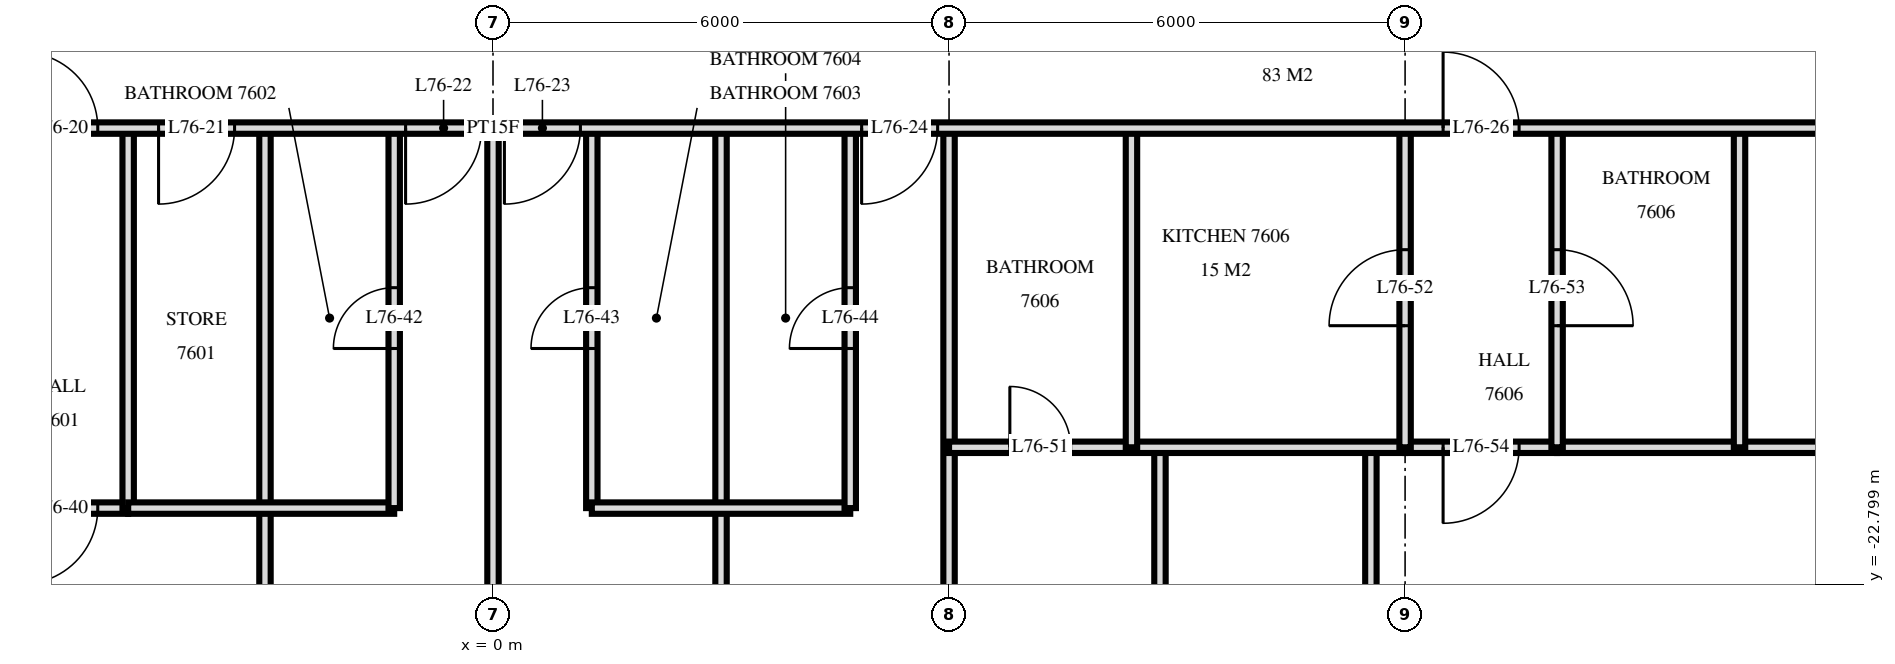
"""IFC4 building model, lengths in metres.
Left out: names, types, materials, properties, quantities, classifications, styles, units other than length and angle.
Written with IfcOpenShell. Run it as: python <this file> out.ifc"""

import sys

from ifc_helpers import new_model, si_unit, direction, frame, frame_2d, origin, place, context, subcontext, project, spatial, rectangle, extrude, element, fill, save


model = new_model("IFC4")
c1 = context("Model", 3, precision=1e-05, world=origin(), true_north=direction((0.0, 1.0)))
c2 = subcontext(c1, "Body", "Model", "MODEL_VIEW")
j1 = project(units=[si_unit("LENGTHUNIT", "METRE"), si_unit("PLANEANGLEUNIT", "RADIAN")], contexts=[c1])
p1 = place(None, origin())
s1 = spatial("IfcSite", under=j1, at=p1, CompositionType="ELEMENT")
p2 = place(p1, origin())
s2 = spatial("IfcBuilding", under=s1, at=p2, CompositionType="ELEMENT")
p3 = place(p2, frame((0.0, 0.0, 287.6)))
s3 = spatial("IfcBuildingStorey", under=s2, at=p3, CompositionType="ELEMENT", Elevation=287.6)
p4 = place(p3, frame((16.4, -21.0, 0.0), z_axis=(0.0, 0.0, 1.0), x_axis=(0.0, 1.0, 0.0)))
e1 = element("IfcWall", 1, at=p4, inside=s3, PredefinedType="PARTITIONING", context=c2, shape_type="SweptSolid", body=[
    extrude(rectangle(XDim=4.2, YDim=0.15, at=frame_2d((2.1, 0.0))), origin(), (0.0, 0.0, 1.0), 3.22),
])
p5 = place(p3, frame((14.0, -21.0, 0.0), z_axis=(0.0, 0.0, 1.0), x_axis=(0.0, 1.0, 0.0)))
e2 = element("IfcWall", 2, at=p5, inside=s3, PredefinedType="PARTITIONING", context=c2, shape_type="SweptSolid", body=[
    extrude(rectangle(XDim=4.2, YDim=0.15, at=frame_2d((2.1, 0.0))), origin(), (0.0, 0.0, 1.0), 3.22),
])
p6 = place(p5, frame((1.6, 0.0, 0.0)))
e3 = element("IfcOpeningElement", 3, at=p6, cuts=e2, PredefinedType="OPENING", context=c2, shape_type="SweptSolid", body=[
    extrude(rectangle(XDim=1.0, YDim=2.1, at=frame_2d((0.5, 1.05))), frame((0.0, 0.085, 0.0), z_axis=(0.0, -1.0, 0.0), x_axis=(1.0, 0.0, 0.0)), (0.0, 0.0, 1.0), 0.17),
])
p7 = place(p3, frame((12.0, -21.0, 0.0), z_axis=(0.0, 0.0, 1.0), x_axis=(0.0, 1.0, 0.0)))
e4 = element("IfcWall", 4, at=p7, inside=s3, PredefinedType="PARTITIONING", context=c2, shape_type="SweptSolid", body=[
    extrude(rectangle(XDim=4.2, YDim=0.15, at=frame_2d((2.1, 0.0))), origin(), (0.0, 0.0, 1.0), 3.22),
])
p8 = place(p7, frame((1.6, 0.0, 0.0)))
e5 = element("IfcOpeningElement", 5, at=p8, cuts=e4, PredefinedType="OPENING", context=c2, shape_type="SweptSolid", body=[
    extrude(rectangle(XDim=1.0, YDim=2.1, at=frame_2d((0.5, 1.05))), frame((0.0, 0.085, 0.0), z_axis=(0.0, -1.0, 0.0), x_axis=(1.0, 0.0, 0.0)), (0.0, 0.0, 1.0), 0.17),
])
p9 = place(p3, frame((11.55, -33.62, 0.0), z_axis=(0.0, 0.0, 1.0), x_axis=(0.0, 1.0, 0.0)))
e6 = element("IfcWall", 6, at=p9, inside=s3, PredefinedType="PARTITIONING", context=c2, shape_type="SweptSolid", body=[
    extrude(rectangle(XDim=12.62, YDim=0.15, at=frame_2d((6.31, 0.0))), origin(), (0.0, 0.0, 1.0), 3.22),
])
p10 = place(p9, frame((5.79, 0.0, 0.0)))
e7 = element("IfcOpeningElement", 7, at=p10, cuts=e6, PredefinedType="OPENING", context=c2, shape_type="SweptSolid", body=[
    extrude(rectangle(XDim=0.9, YDim=2.1, at=frame_2d((0.45, 1.05))), frame((0.0, 0.085, 0.0), z_axis=(0.0, -1.0, 0.0), x_axis=(1.0, 0.0, 0.0)), (0.0, 0.0, 1.0), 0.17),
])
p11 = place(p3, frame((8.775, -33.62, 0.0), z_axis=(0.0, 0.0, 1.0), x_axis=(0.0, 1.0, 0.0)))
e8 = element("IfcWall", 8, at=p11, inside=s3, PredefinedType="PARTITIONING", context=c2, shape_type="SweptSolid", body=[
    extrude(rectangle(XDim=12.62, YDim=0.15, at=frame_2d((6.31, 0.0))), origin(), (0.0, 0.0, 1.0), 3.22),
])
p12 = place(p11, frame((5.77, 0.0, 0.0)))
e9 = element("IfcOpeningElement", 9, at=p12, cuts=e8, PredefinedType="OPENING", context=c2, shape_type="SweptSolid", body=[
    extrude(rectangle(XDim=0.9, YDim=2.1, at=frame_2d((0.45, 1.05))), frame((0.0, 0.085, 0.0), z_axis=(0.0, -1.0, 0.0), x_axis=(1.0, 0.0, 0.0)), (0.0, 0.0, 1.0), 0.17),
])
p13 = place(p3, frame((8.4, -21.0, 0.0), z_axis=(0.0, 0.0, 1.0), x_axis=(0.0, 1.0, 0.0)))
e10 = element("IfcWall", 10, at=p13, inside=s3, PredefinedType="PARTITIONING", context=c2, shape_type="SweptSolid", body=[
    extrude(rectangle(XDim=4.2, YDim=0.15, at=frame_2d((2.1, 0.0))), origin(), (0.0, 0.0, 1.0), 3.22),
])
p14 = place(p3, frame((6.0, -33.62, 0.0), z_axis=(0.0, 0.0, 1.0), x_axis=(0.0, 1.0, 0.0)))
e11 = element("IfcWall", 11, at=p14, inside=s3, PredefinedType="PARTITIONING", context=c2, shape_type="SweptSolid", body=[
    extrude(rectangle(XDim=16.82, YDim=0.15, at=frame_2d((8.41, 0.0))), origin(), (0.0, 0.0, 1.0), 3.22),
])
p15 = place(p3, frame((4.7, -21.8, 0.0), z_axis=(0.0, 0.0, 1.0), x_axis=(0.0, 1.0, 0.0)))
e12 = element("IfcWall", 12, at=p15, inside=s3, PredefinedType="PARTITIONING", context=c2, shape_type="SweptSolid", body=[
    extrude(rectangle(XDim=5.0, YDim=0.15, at=frame_2d((2.5, 0.0))), origin(), (0.0, 0.0, 1.0), 3.22),
])
p16 = place(p15, frame((2.1, 0.0, 0.0)))
e13 = element("IfcOpeningElement", 13, at=p16, cuts=e12, PredefinedType="OPENING", context=c2, shape_type="SweptSolid", body=[
    extrude(rectangle(XDim=0.8, YDim=2.1, at=frame_2d((0.4, 1.05))), frame((0.0, 0.085, 0.0), z_axis=(0.0, -1.0, 0.0), x_axis=(1.0, 0.0, 0.0)), (0.0, 0.0, 1.0), 0.17),
])
p17 = place(p3, frame((3.0, -33.62, 0.0), z_axis=(0.0, 0.0, 1.0), x_axis=(0.0, 1.0, 0.0)))
e14 = element("IfcWall", 14, at=p17, inside=s3, PredefinedType="PARTITIONING", context=c2, shape_type="SweptSolid", body=[
    extrude(rectangle(XDim=16.82, YDim=0.15, at=frame_2d((8.41, 0.0))), origin(), (0.0, 0.0, 1.0), 3.22),
])
p18 = place(p3, frame((1.3, -21.8, 0.0), z_axis=(0.0, 0.0, 1.0), x_axis=(0.0, 1.0, 0.0)))
e15 = element("IfcWall", 15, at=p18, inside=s3, PredefinedType="PARTITIONING", context=c2, shape_type="SweptSolid", body=[
    extrude(rectangle(XDim=5.0, YDim=0.15, at=frame_2d((2.5, 0.0))), origin(), (0.0, 0.0, 1.0), 3.22),
])
p19 = place(p18, frame((2.1, 0.0, 0.0)))
e16 = element("IfcOpeningElement", 16, at=p19, cuts=e15, PredefinedType="OPENING", context=c2, shape_type="SweptSolid", body=[
    extrude(rectangle(XDim=0.8, YDim=2.1, at=frame_2d((0.4, 1.05))), frame((0.0, 0.085, 0.0), z_axis=(0.0, -1.0, 0.0), x_axis=(1.0, 0.0, 0.0)), (0.0, 0.0, 1.0), 0.17),
])
p20 = place(p3, frame((0.0, -33.62, 0.0), z_axis=(0.0, 0.0, 1.0), x_axis=(0.0, 1.0, 0.0)))
e17 = element("IfcWall", 17, at=p20, inside=s3, PredefinedType="PARTITIONING", context=c2, shape_type="SweptSolid", body=[
    extrude(rectangle(XDim=16.82, YDim=0.15, at=frame_2d((8.41, 0.0))), origin(), (0.0, 0.0, 1.0), 3.22),
])
p21 = place(p3, frame((-1.3, -21.8, 0.0), z_axis=(0.0, 0.0, 1.0), x_axis=(0.0, 1.0, 0.0)))
e18 = element("IfcWall", 18, at=p21, inside=s3, PredefinedType="PARTITIONING", context=c2, shape_type="SweptSolid", body=[
    extrude(rectangle(XDim=5.0, YDim=0.15, at=frame_2d((2.5, 0.0))), origin(), (0.0, 0.0, 1.0), 3.22),
])
p22 = place(p21, frame((2.1, 0.0, 0.0)))
e19 = element("IfcOpeningElement", 19, at=p22, cuts=e18, PredefinedType="OPENING", context=c2, shape_type="SweptSolid", body=[
    extrude(rectangle(XDim=0.8, YDim=2.1, at=frame_2d((0.4, 1.05))), frame((0.0, 0.085, 0.0), z_axis=(0.0, -1.0, 0.0), x_axis=(1.0, 0.0, 0.0)), (0.0, 0.0, 1.0), 0.17),
])
p23 = place(p3, frame((-3.0, -33.62, 0.0), z_axis=(0.0, 0.0, 1.0), x_axis=(0.0, 1.0, 0.0)))
e20 = element("IfcWall", 20, at=p23, inside=s3, PredefinedType="PARTITIONING", context=c2, shape_type="SweptSolid", body=[
    extrude(rectangle(XDim=16.82, YDim=0.15, at=frame_2d((8.41, 0.0))), origin(), (0.0, 0.0, 1.0), 3.22),
])
p24 = place(p3, frame((-4.8, -21.8, 0.0), z_axis=(0.0, 0.0, 1.0), x_axis=(0.0, 1.0, 0.0)))
e21 = element("IfcWall", 21, at=p24, inside=s3, PredefinedType="PARTITIONING", context=c2, shape_type="SweptSolid", body=[
    extrude(rectangle(XDim=5.0, YDim=0.15, at=frame_2d((2.5, 0.0))), origin(), (0.0, 0.0, 1.0), 3.22),
])
p25 = place(p3, frame((-6.6, -21.8, 0.0), z_axis=(0.0, 0.0, 1.0), x_axis=(1.0, 0.0, 0.0)))
e22 = element("IfcWall", 22, at=p25, inside=s3, PredefinedType="PARTITIONING", context=c2, shape_type="SweptSolid", body=[
    extrude(rectangle(XDim=1.8, YDim=0.15, at=frame_2d((0.9, 0.0))), origin(), (0.0, 0.0, 1.0), 3.22),
])
p26 = place(p25, frame((0.4, 0.0, 0.0)))
e23 = element("IfcOpeningElement", 23, at=p26, cuts=e22, PredefinedType="OPENING", context=c2, shape_type="SweptSolid", body=[
    extrude(rectangle(XDim=1.0, YDim=2.1, at=frame_2d((0.5, 1.05))), frame((0.0, 0.085, 0.0), z_axis=(0.0, -1.0, 0.0), x_axis=(1.0, 0.0, 0.0)), (0.0, 0.0, 1.0), 0.17),
])
p27 = place(p3, frame((-4.8, -21.8, 0.0), z_axis=(0.0, 0.0, 1.0), x_axis=(1.0, 0.0, 0.0)))
e24 = element("IfcWall", 24, at=p27, inside=s3, PredefinedType="PARTITIONING", context=c2, shape_type="SweptSolid", body=[
    extrude(rectangle(XDim=3.5, YDim=0.15, at=frame_2d((1.75, 0.0))), origin(), (0.0, 0.0, 1.0), 3.22),
])
p28 = place(p3, frame((1.3, -21.8, 0.0), z_axis=(0.0, 0.0, 1.0), x_axis=(1.0, 0.0, 0.0)))
e25 = element("IfcWall", 25, at=p28, inside=s3, PredefinedType="PARTITIONING", context=c2, shape_type="SweptSolid", body=[
    extrude(rectangle(XDim=3.4, YDim=0.15, at=frame_2d((1.7, 0.0))), origin(), (0.0, 0.0, 1.0), 3.22),
])
p29 = place(p3, frame((12.0, -21.0, 0.0), z_axis=(0.0, 0.0, 1.0), x_axis=(1.0, 0.0, 0.0)))
e26 = element("IfcWall", 26, at=p29, inside=s3, PredefinedType="PARTITIONING", context=c2, shape_type="SweptSolid", body=[
    extrude(rectangle(XDim=2.0, YDim=0.15, at=frame_2d((1.0, 0.0))), origin(), (0.0, 0.0, 1.0), 3.22),
])
p30 = place(p29, frame((0.5, 0.0, 0.0)))
e27 = element("IfcOpeningElement", 27, at=p30, cuts=e26, PredefinedType="OPENING", context=c2, shape_type="SweptSolid", body=[
    extrude(rectangle(XDim=1.0, YDim=2.1, at=frame_2d((0.5, 1.05))), frame((0.0, 0.085, 0.0), z_axis=(0.0, -1.0, 0.0), x_axis=(1.0, 0.0, 0.0)), (0.0, 0.0, 1.0), 0.17),
])
p31 = place(p3, frame((6.0, -21.0, 0.0), z_axis=(0.0, 0.0, 1.0), x_axis=(1.0, 0.0, 0.0)))
e28 = element("IfcWall", 28, at=p31, inside=s3, PredefinedType="PARTITIONING", context=c2, shape_type="SweptSolid", body=[
    extrude(rectangle(XDim=6.0, YDim=0.15, at=frame_2d((3.0, 0.0))), origin(), (0.0, 0.0, 1.0), 3.22),
])
p32 = place(p31, frame((0.8, 0.0, 0.0)))
e29 = element("IfcOpeningElement", 29, at=p32, cuts=e28, PredefinedType="OPENING", context=c2, shape_type="SweptSolid", body=[
    extrude(rectangle(XDim=0.8, YDim=2.1, at=frame_2d((0.4, 1.05))), frame((0.0, 0.085, 0.0), z_axis=(0.0, -1.0, 0.0), x_axis=(1.0, 0.0, 0.0)), (0.0, 0.0, 1.0), 0.17),
])
p33 = place(p3, frame((14.0, -21.0, 0.0), z_axis=(0.0, 0.0, 1.0), x_axis=(1.0, 0.0, 0.0)))
e30 = element("IfcWall", 30, at=p33, inside=s3, PredefinedType="PARTITIONING", context=c2, shape_type="SweptSolid", body=[
    extrude(rectangle(XDim=8.92, YDim=0.15, at=frame_2d((4.46, 0.0))), origin(), (0.0, 0.0, 1.0), 3.22),
])
p34 = place(p3, frame((-22.92, -16.8, 0.0), z_axis=(0.0, 0.0, 1.0), x_axis=(1.0, 0.0, 0.0)))
e31 = element("IfcWall", 31, at=p34, inside=s3, PredefinedType="PARTITIONING", context=c2, shape_type="SweptSolid", body=[
    extrude(rectangle(XDim=45.84, YDim=0.15, at=frame_2d((22.92, 0.0))), origin(), (0.0, 0.0, 1.0), 3.22),
])
p35 = place(p34, frame((16.72, 0.0, 0.0)))
e32 = element("IfcOpeningElement", 32, at=p35, cuts=e31, PredefinedType="OPENING", context=c2, shape_type="SweptSolid", body=[
    extrude(rectangle(XDim=1.0, YDim=2.1, at=frame_2d((0.5, 1.05))), frame((0.0, 0.085, 0.0), z_axis=(0.0, -1.0, 0.0), x_axis=(1.0, 0.0, 0.0)), (0.0, 0.0, 1.0), 0.17),
])
p36 = place(p34, frame((18.52, 0.0, 0.0)))
e33 = element("IfcOpeningElement", 33, at=p36, cuts=e31, PredefinedType="OPENING", context=c2, shape_type="SweptSolid", body=[
    extrude(rectangle(XDim=1.0, YDim=2.1, at=frame_2d((0.5, 1.05))), frame((0.0, 0.085, 0.0), z_axis=(0.0, -1.0, 0.0), x_axis=(1.0, 0.0, 0.0)), (0.0, 0.0, 1.0), 0.17),
])
p37 = place(p34, frame((21.77, 0.0, 0.0)))
e34 = element("IfcOpeningElement", 34, at=p37, cuts=e31, PredefinedType="OPENING", context=c2, shape_type="SweptSolid", body=[
    extrude(rectangle(XDim=1.0, YDim=2.1, at=frame_2d((0.5, 1.05))), frame((0.0, 0.085, 0.0), z_axis=(0.0, -1.0, 0.0), x_axis=(1.0, 0.0, 0.0)), (0.0, 0.0, 1.0), 0.17),
])
p38 = place(p34, frame((23.07, 0.0, 0.0)))
e35 = element("IfcOpeningElement", 35, at=p38, cuts=e31, PredefinedType="OPENING", context=c2, shape_type="SweptSolid", body=[
    extrude(rectangle(XDim=1.0, YDim=2.1, at=frame_2d((0.5, 1.05))), frame((0.0, 0.085, 0.0), z_axis=(0.0, -1.0, 0.0), x_axis=(1.0, 0.0, 0.0)), (0.0, 0.0, 1.0), 0.17),
])
p39 = place(p34, frame((27.77, 0.0, 0.0)))
e36 = element("IfcOpeningElement", 36, at=p39, cuts=e31, PredefinedType="OPENING", context=c2, shape_type="SweptSolid", body=[
    extrude(rectangle(XDim=1.0, YDim=2.1, at=frame_2d((0.5, 1.05))), frame((0.0, 0.085, 0.0), z_axis=(0.0, -1.0, 0.0), x_axis=(1.0, 0.0, 0.0)), (0.0, 0.0, 1.0), 0.17),
])
p40 = place(p34, frame((7.02, 0.0, 0.0)))
e37 = element("IfcOpeningElement", 37, at=p40, cuts=e31, PredefinedType="OPENING", context=c2, shape_type="SweptSolid", body=[
    extrude(rectangle(XDim=1.0, YDim=2.1, at=frame_2d((0.5, 1.05))), frame((0.0, 0.085, 0.0), z_axis=(0.0, -1.0, 0.0), x_axis=(1.0, 0.0, 0.0)), (0.0, 0.0, 1.0), 0.17),
])
p41 = place(p34, frame((35.42, 0.0, 0.0)))
e38 = element("IfcOpeningElement", 38, at=p41, cuts=e31, PredefinedType="OPENING", context=c2, shape_type="SweptSolid", body=[
    extrude(rectangle(XDim=1.0, YDim=2.1, at=frame_2d((0.5, 1.05))), frame((0.0, 0.085, 0.0), z_axis=(0.0, -1.0, 0.0), x_axis=(1.0, 0.0, 0.0)), (0.0, 0.0, 1.0), 0.17),
])
p42 = place(p34, frame((42.19, 0.0, 0.0)))
e39 = element("IfcOpeningElement", 39, at=p42, cuts=e31, PredefinedType="OPENING", context=c2, shape_type="SweptSolid", body=[
    extrude(rectangle(XDim=1.0, YDim=2.1, at=frame_2d((0.5, 1.05))), frame((0.0, 0.085, 0.0), z_axis=(0.0, -1.0, 0.0), x_axis=(1.0, 0.0, 0.0)), (0.0, 0.0, 1.0), 0.17),
])
p43 = place(p35, origin())
e40 = element("IfcDoor", 40, at=p43, inside=s3, OperationType="SINGLE_SWING_RIGHT", PredefinedType="DOOR", context=c2, shape_type="SweptSolid", body=[
    extrude(rectangle(XDim=1.0, YDim=2.1, at=frame_2d((0.5, 1.05))), frame((0.0, 0.025, 0.0), z_axis=(0.0, -1.0, 0.0), x_axis=(1.0, 0.0, 0.0)), (0.0, 0.0, 1.0), 0.05),
])
fill(e32, e40)
p44 = place(p36, frame((0.5, 0.0, 0.0), z_axis=(0.0, 0.0, 1.0), x_axis=(-1.0, 0.0, 0.0)))
e41 = element("IfcDoor", 41, at=p44, inside=s3, OperationType="SINGLE_SWING_LEFT", PredefinedType="DOOR", context=c2, shape_type="SweptSolid", body=[
    extrude(rectangle(XDim=1.0, YDim=2.1, at=frame_2d((0.0, 1.05))), frame((0.0, -0.025, 0.0), z_axis=(0.0, 1.0, 0.0), x_axis=(-1.0, 0.0, 0.0)), (0.0, 0.0, 1.0), 0.05),
])
fill(e33, e41)
p45 = place(p37, frame((0.5, 0.0, 0.0), z_axis=(0.0, 0.0, 1.0), x_axis=(-1.0, 0.0, 0.0)))
e42 = element("IfcDoor", 42, at=p45, inside=s3, OperationType="SINGLE_SWING_LEFT", PredefinedType="DOOR", context=c2, shape_type="SweptSolid", body=[
    extrude(rectangle(XDim=1.0, YDim=2.1, at=frame_2d((0.0, 1.05))), frame((0.0, -0.025, 0.0), z_axis=(0.0, 1.0, 0.0), x_axis=(-1.0, 0.0, 0.0)), (0.0, 0.0, 1.0), 0.05),
])
fill(e34, e42)
p46 = place(p38, frame((0.5, 0.0, 0.0), z_axis=(0.0, 0.0, 1.0), x_axis=(-1.0, 0.0, 0.0)))
e43 = element("IfcDoor", 43, at=p46, inside=s3, OperationType="SINGLE_SWING_LEFT", PredefinedType="DOOR", context=c2, shape_type="SweptSolid", body=[
    extrude(rectangle(XDim=1.0, YDim=2.1, at=frame_2d((0.0, 1.05))), frame((0.0, -0.025, 0.0), z_axis=(0.0, 1.0, 0.0), x_axis=(-1.0, 0.0, 0.0)), (0.0, 0.0, 1.0), 0.05),
])
fill(e35, e43)
p47 = place(p39, frame((0.5, 0.0, 0.0), z_axis=(0.0, 0.0, 1.0), x_axis=(-1.0, 0.0, 0.0)))
e44 = element("IfcDoor", 44, at=p47, inside=s3, OperationType="SINGLE_SWING_LEFT", PredefinedType="DOOR", context=c2, shape_type="SweptSolid", body=[
    extrude(rectangle(XDim=1.0, YDim=2.1, at=frame_2d((0.0, 1.05))), frame((0.0, -0.025, 0.0), z_axis=(0.0, 1.0, 0.0), x_axis=(-1.0, 0.0, 0.0)), (0.0, 0.0, 1.0), 0.05),
])
fill(e36, e44)
p48 = place(p41, origin())
e45 = element("IfcDoor", 45, at=p48, inside=s3, OperationType="SINGLE_SWING_RIGHT", PredefinedType="DOOR", context=c2, shape_type="SweptSolid", body=[
    extrude(rectangle(XDim=1.0, YDim=2.1, at=frame_2d((0.5, 1.05))), frame((0.0, 0.025, 0.0), z_axis=(0.0, -1.0, 0.0), x_axis=(1.0, 0.0, 0.0)), (0.0, 0.0, 1.0), 0.05),
])
fill(e38, e45)
p49 = place(p26, frame((0.5, 0.0, 0.0), z_axis=(0.0, 0.0, 1.0), x_axis=(-1.0, 0.0, 0.0)))
e46 = element("IfcDoor", 46, at=p49, inside=s3, OperationType="SINGLE_SWING_LEFT", PredefinedType="DOOR", context=c2, shape_type="SweptSolid", body=[
    extrude(rectangle(XDim=1.0, YDim=2.1, at=frame_2d((0.0, 1.05))), frame((0.0, -0.025, 0.0), z_axis=(0.0, 1.0, 0.0), x_axis=(-1.0, 0.0, 0.0)), (0.0, 0.0, 1.0), 0.05),
])
fill(e23, e46)
p50 = place(p22, origin())
e47 = element("IfcDoor", 47, at=p50, inside=s3, OperationType="SINGLE_SWING_RIGHT", PredefinedType="DOOR", context=c2, shape_type="SweptSolid", body=[
    extrude(rectangle(XDim=0.8, YDim=2.1, at=frame_2d((0.4, 1.05))), frame((0.0, 0.025, 0.0), z_axis=(0.0, -1.0, 0.0), x_axis=(1.0, 0.0, 0.0)), (0.0, 0.0, 1.0), 0.05),
])
fill(e19, e47)
p51 = place(p19, origin())
e48 = element("IfcDoor", 48, at=p51, inside=s3, OperationType="SINGLE_SWING_RIGHT", PredefinedType="DOOR", context=c2, shape_type="SweptSolid", body=[
    extrude(rectangle(XDim=0.8, YDim=2.1, at=frame_2d((0.4, 1.05))), frame((0.0, 0.025, 0.0), z_axis=(0.0, -1.0, 0.0), x_axis=(1.0, 0.0, 0.0)), (0.0, 0.0, 1.0), 0.05),
])
fill(e16, e48)
p52 = place(p16, origin())
e49 = element("IfcDoor", 49, at=p52, inside=s3, OperationType="SINGLE_SWING_RIGHT", PredefinedType="DOOR", context=c2, shape_type="SweptSolid", body=[
    extrude(rectangle(XDim=0.8, YDim=2.1, at=frame_2d((0.4, 1.05))), frame((0.0, 0.025, 0.0), z_axis=(0.0, -1.0, 0.0), x_axis=(1.0, 0.0, 0.0)), (0.0, 0.0, 1.0), 0.05),
])
fill(e13, e49)
p53 = place(p32, origin())
e50 = element("IfcDoor", 50, at=p53, inside=s3, OperationType="SINGLE_SWING_RIGHT", PredefinedType="DOOR", context=c2, shape_type="SweptSolid", body=[
    extrude(rectangle(XDim=0.8, YDim=2.1, at=frame_2d((0.4, 1.05))), frame((0.0, 0.025, 0.0), z_axis=(0.0, -1.0, 0.0), x_axis=(1.0, 0.0, 0.0)), (0.0, 0.0, 1.0), 0.05),
])
fill(e29, e50)
p54 = place(p8, origin())
e51 = element("IfcDoor", 51, at=p54, inside=s3, OperationType="SINGLE_SWING_RIGHT", PredefinedType="DOOR", context=c2, shape_type="SweptSolid", body=[
    extrude(rectangle(XDim=1.0, YDim=2.1, at=frame_2d((0.5, 1.05))), frame((0.0, 0.025, 0.0), z_axis=(0.0, -1.0, 0.0), x_axis=(1.0, 0.0, 0.0)), (0.0, 0.0, 1.0), 0.05),
])
fill(e5, e51)
p55 = place(p6, frame((0.5, 0.0, 0.0), z_axis=(0.0, 0.0, 1.0), x_axis=(-1.0, 0.0, 0.0)))
e52 = element("IfcDoor", 52, at=p55, inside=s3, OperationType="SINGLE_SWING_LEFT", PredefinedType="DOOR", context=c2, shape_type="SweptSolid", body=[
    extrude(rectangle(XDim=1.0, YDim=2.1, at=frame_2d((0.0, 1.05))), frame((0.0, -0.025, 0.0), z_axis=(0.0, 1.0, 0.0), x_axis=(-1.0, 0.0, 0.0)), (0.0, 0.0, 1.0), 0.05),
])
fill(e3, e52)
p56 = place(p30, frame((0.5, 0.0, 0.0), z_axis=(0.0, 0.0, 1.0), x_axis=(-1.0, 0.0, 0.0)))
e53 = element("IfcDoor", 53, at=p56, inside=s3, OperationType="SINGLE_SWING_LEFT", PredefinedType="DOOR", context=c2, shape_type="SweptSolid", body=[
    extrude(rectangle(XDim=1.0, YDim=2.1, at=frame_2d((0.0, 1.05))), frame((0.0, -0.025, 0.0), z_axis=(0.0, 1.0, 0.0), x_axis=(-1.0, 0.0, 0.0)), (0.0, 0.0, 1.0), 0.05),
])
fill(e27, e53)
save(model, sys.argv[1])
